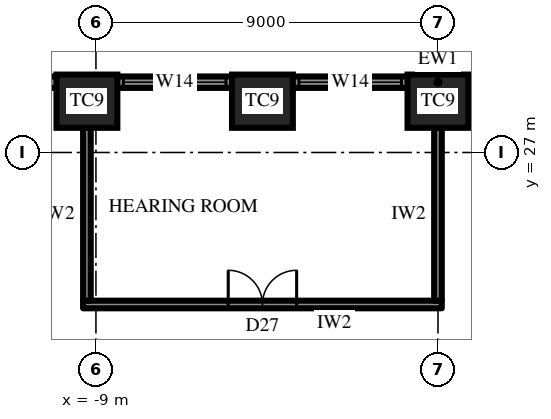
"""IFC4 building model, lengths in metres.
Left out: names, types, materials, properties, quantities, classifications, styles, units other than length and angle.
Written with IfcOpenShell. Run it as: python <this file> out.ifc"""

import sys

from ifc_helpers import new_model, si_unit, direction, frame, frame_2d, origin, origin_2d, place, context, subcontext, project, spatial, rectangle, extrude, element, fill, save


model = new_model("IFC4")
c1 = context("Model", 3, precision=1e-05, world=origin(), true_north=direction((0.0, 1.0)))
c2 = subcontext(c1, "Body", "Model", "MODEL_VIEW")
j1 = project(units=[si_unit("LENGTHUNIT", "METRE"), si_unit("PLANEANGLEUNIT", "RADIAN")], contexts=[c1])
p1 = place(None, origin())
s1 = spatial("IfcSite", under=j1, at=p1, CompositionType="ELEMENT")
p2 = place(p1, origin())
s2 = spatial("IfcBuilding", under=s1, at=p2, CompositionType="ELEMENT")
p3 = place(p2, frame((0.0, 0.0, 232.3)))
s3 = spatial("IfcBuildingStorey", under=s2, at=p3, CompositionType="ELEMENT", Elevation=232.3)
for number, where, z_axis, x_axis in (
    (1, (0.0, 28.35, 0.0), (0.0, 0.0, 1.0), (-1.0, 0.0, 0.0)),
    (2, (-4.619, 28.35, 0.0), (0.0, 0.0, 1.0), (-1.0, 0.0, 0.0)),
    (3, (-9.238, 28.35, 0.0), (0.0, 0.0, 1.0), (-1.0, 0.0, 0.0)),
):
    element("IfcColumn", number, at=place(p3, frame(where, z_axis=z_axis, x_axis=x_axis)), inside=s3, PredefinedType="COLUMN", context=c2, shape_type="SweptSolid", body=[
        extrude(rectangle(XDim=1.6, YDim=1.4, at=origin_2d()), origin(), (0.0, 0.0, 1.0), 4.2),
    ])
p4 = place(p3, frame((12.556, 28.85, 0.0), z_axis=(0.0, 0.0, 1.0), x_axis=(-1.0, 0.0, 0.0)))
e4 = element("IfcWall", 4, at=p4, inside=s3, PredefinedType="SOLIDWALL", context=c2, shape_type="SweptSolid", body=[
    extrude(rectangle(XDim=25.113, YDim=0.3, at=frame_2d((12.556, 0.0))), origin(), (0.0, 0.0, 1.0), 2.8),
])
p5 = place(p4, frame((4.278, 0.0, 0.6)))
e5 = element("IfcOpeningElement", 5, at=p5, cuts=e4, PredefinedType="OPENING", context=c2, shape_type="SweptSolid", body=[
    extrude(rectangle(XDim=2.7, YDim=1.95, at=frame_2d((1.35, 0.975))), frame((0.0, 0.16, 0.0), z_axis=(0.0, -1.0, 0.0), x_axis=(1.0, 0.0, 0.0)), (0.0, 0.0, 1.0), 0.32),
])
p6 = place(p4, frame((9.647, 0.0, 0.0)))
e6 = element("IfcOpeningElement", 6, at=p6, cuts=e4, PredefinedType="OPENING", context=c2, shape_type="SweptSolid", body=[
    extrude(rectangle(XDim=1.2, YDim=2.4, at=frame_2d((0.6, 1.2))), frame((0.0, 0.16, 0.0), z_axis=(0.0, -1.0, 0.0), x_axis=(1.0, 0.0, 0.0)), (0.0, 0.0, 1.0), 0.32),
])
p7 = place(p4, frame((13.516, 0.0, 0.6)))
e7 = element("IfcOpeningElement", 7, at=p7, cuts=e4, PredefinedType="OPENING", context=c2, shape_type="SweptSolid", body=[
    extrude(rectangle(XDim=2.7, YDim=1.95, at=frame_2d((1.35, 0.975))), frame((0.0, 0.16, 0.0), z_axis=(0.0, -1.0, 0.0), x_axis=(1.0, 0.0, 0.0)), (0.0, 0.0, 1.0), 0.32),
])
p8 = place(p4, frame((18.135, 0.0, 0.6)))
e8 = element("IfcOpeningElement", 8, at=p8, cuts=e4, PredefinedType="OPENING", context=c2, shape_type="SweptSolid", body=[
    extrude(rectangle(XDim=2.7, YDim=1.95, at=frame_2d((1.35, 0.975))), frame((0.0, 0.16, 0.0), z_axis=(0.0, -1.0, 0.0), x_axis=(1.0, 0.0, 0.0)), (0.0, 0.0, 1.0), 0.32),
])
p9 = place(p3, frame((0.1, 23.0, 0.0), z_axis=(0.0, 0.0, 1.0), x_axis=(-1.0, 0.0, 0.0)))
e9 = element("IfcWall", 9, at=p9, inside=s3, PredefinedType="PARTITIONING", context=c2, shape_type="SweptSolid", body=[
    extrude(rectangle(XDim=9.438, YDim=0.2, at=frame_2d((4.719, 0.0))), origin(), (0.0, 0.0, 1.0), 4.0),
])
p10 = place(p9, frame((3.819, 0.0, 0.0)))
e10 = element("IfcOpeningElement", 10, at=p10, cuts=e9, PredefinedType="OPENING", context=c2, shape_type="SweptSolid", body=[
    extrude(rectangle(XDim=1.8, YDim=2.4, at=frame_2d((0.9, 1.2))), frame((0.0, 0.11, 0.0), z_axis=(0.0, -1.0, 0.0), x_axis=(1.0, 0.0, 0.0)), (0.0, 0.0, 1.0), 0.22),
])
for number, where, z_axis, x_axis in (
    (11, (0.0, 23.1, 0.0), (0.0, 0.0, 1.0), (0.0, 1.0, 0.0)),
    (12, (-9.238, 23.1, 0.0), (0.0, 0.0, 1.0), (0.0, 1.0, 0.0)),
):
    element("IfcWall", number, at=place(p3, frame(where, z_axis=z_axis, x_axis=x_axis)), inside=s3, PredefinedType="PARTITIONING", context=c2, shape_type="SweptSolid", body=[
        extrude(rectangle(XDim=4.55, YDim=0.2, at=frame_2d((2.275, 0.0))), origin(), (0.0, 0.0, 1.0), 2.992),
    ])
p11 = place(p7, origin())
e13 = element("IfcWindow", 13, at=p11, inside=s3, PartitioningType="SINGLE_PANEL", PredefinedType="WINDOW", context=c2, shape_type="SweptSolid", body=[
    extrude(rectangle(XDim=2.7, YDim=1.95, at=frame_2d((1.35, 0.975))), frame((0.0, 0.03, 0.0), z_axis=(0.0, -1.0, 0.0), x_axis=(1.0, 0.0, 0.0)), (0.0, 0.0, 1.0), 0.06),
])
fill(e7, e13)
p12 = place(p8, origin())
e14 = element("IfcWindow", 14, at=p12, inside=s3, PartitioningType="SINGLE_PANEL", PredefinedType="WINDOW", context=c2, shape_type="SweptSolid", body=[
    extrude(rectangle(XDim=2.7, YDim=1.95, at=frame_2d((1.35, 0.975))), frame((0.0, 0.03, 0.0), z_axis=(0.0, -1.0, 0.0), x_axis=(1.0, 0.0, 0.0)), (0.0, 0.0, 1.0), 0.06),
])
fill(e8, e14)
p13 = place(p10, frame((1.8, 0.0, 0.0), z_axis=(0.0, 0.0, 1.0), x_axis=(-1.0, 0.0, 0.0)))
e15 = element("IfcDoor", 15, at=p13, inside=s3, OperationType="DOUBLE_DOOR_SINGLE_SWING", PredefinedType="DOOR", context=c2, shape_type="SweptSolid", body=[
    extrude(rectangle(XDim=1.8, YDim=2.4, at=frame_2d((0.9, 1.2))), frame((0.0, 0.025, 0.0), z_axis=(0.0, -1.0, 0.0), x_axis=(1.0, 0.0, 0.0)), (0.0, 0.0, 1.0), 0.05),
])
fill(e10, e15)
save(model, sys.argv[1])
